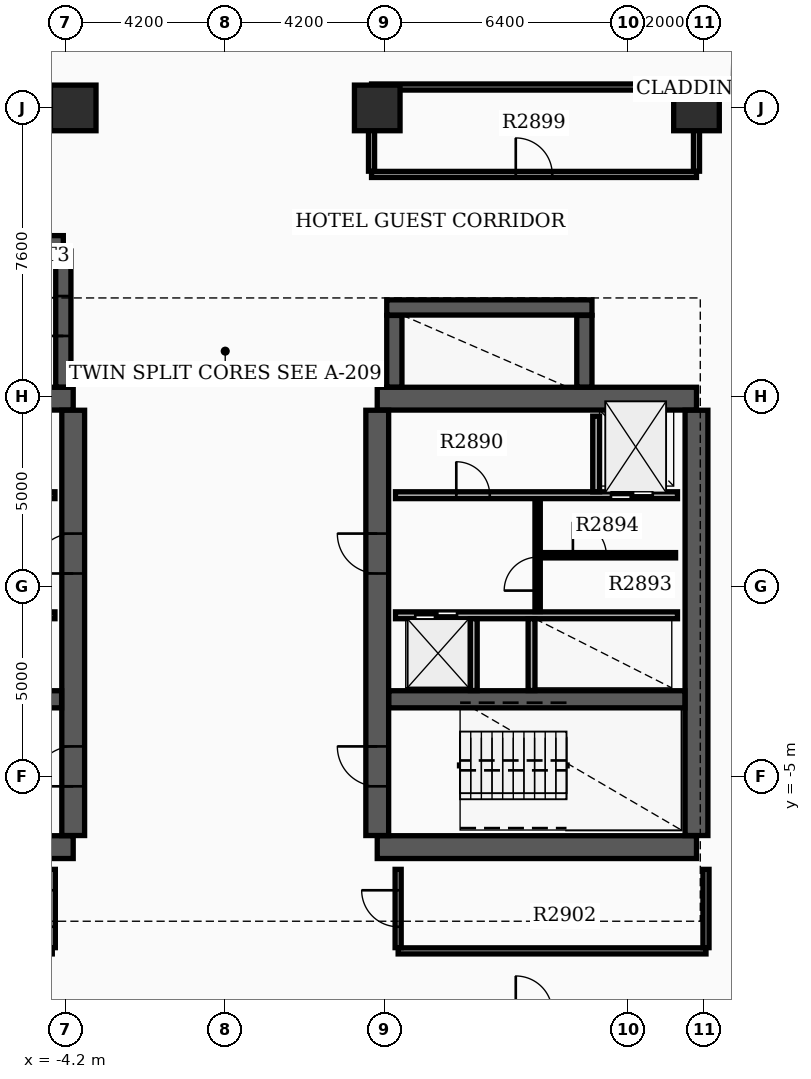
"""IFC4 building model, lengths in metres.
Left out: names, types, materials, properties, quantities, classifications, styles, units other than length and angle.
Written with IfcOpenShell. Run it as: python <this file> out.ifc"""

import sys

from ifc_helpers import new_model, si_unit, direction, frame, frame_2d, origin, origin_2d, place, context, subcontext, project, spatial, rectangle, extrude, element, fill, save


model = new_model("IFC4")
c1 = context("Model", 3, precision=1e-05, world=origin(), true_north=direction((0.0, 1.0)))
c2 = subcontext(c1, "Body", "Model", "MODEL_VIEW")
j1 = project(units=[si_unit("LENGTHUNIT", "METRE"), si_unit("PLANEANGLEUNIT", "RADIAN")], contexts=[c1])
p1 = place(None, origin())
s1 = spatial("IfcSite", under=j1, at=p1, CompositionType="ELEMENT")
p2 = place(p1, origin())
s2 = spatial("IfcBuilding", under=s1, at=p2, CompositionType="ELEMENT")
p3 = place(p2, frame((0.0, 0.0, 180.0)))
s3 = spatial("IfcBuildingStorey", under=s2, at=p3, CompositionType="ELEMENT", Elevation=180.0)
for number, where, z_axis, x_axis in (
    (1, (-12.4, -6.85, 0.0), (0.0, 0.0, 1.0), (1.0, 0.0, 0.0)),
    (2, (-12.4, 4.95, 0.0), (0.0, 0.0, 1.0), (1.0, 0.0, 0.0)),
):
    element("IfcWall", number, at=place(p3, frame(where, z_axis=z_axis, x_axis=x_axis)), inside=s3, PredefinedType="SHEAR", context=c2, shape_type="SweptSolid", body=[
        extrude(rectangle(XDim=8.4, YDim=0.6, at=frame_2d((4.2, 0.0))), origin(), (0.0, 0.0, 1.0), 3.7),
    ])
p4 = place(p3, frame((-4.0, -6.545, 0.0), z_axis=(0.0, 0.0, 1.0), x_axis=(0.0, 1.0, 0.0)))
e3 = element("IfcWall", 3, at=p4, inside=s3, PredefinedType="SHEAR", context=c2, shape_type="SweptSolid", body=[
    extrude(rectangle(XDim=11.19, YDim=0.6, at=frame_2d((5.595, 0.0))), origin(), (0.0, 0.0, 1.0), 3.7),
])
p5 = place(p4, frame((1.295, 0.0, 0.0)))
e4 = element("IfcOpeningElement", 4, at=p5, cuts=e3, PredefinedType="OPENING", context=c2, shape_type="SweptSolid", body=[
    extrude(rectangle(XDim=1.05, YDim=2.15, at=frame_2d((0.525, 1.075))), frame((0.0, 0.31, 0.0), z_axis=(0.0, -1.0, 0.0), x_axis=(1.0, 0.0, 0.0)), (0.0, 0.0, 1.0), 0.62),
])
p6 = place(p4, frame((6.895, 0.0, 0.0)))
e5 = element("IfcOpeningElement", 5, at=p6, cuts=e3, PredefinedType="OPENING", context=c2, shape_type="SweptSolid", body=[
    extrude(rectangle(XDim=1.05, YDim=2.15, at=frame_2d((0.525, 1.075))), frame((0.0, 0.31, 0.0), z_axis=(0.0, -1.0, 0.0), x_axis=(1.0, 0.0, 0.0)), (0.0, 0.0, 1.0), 0.62),
])
p7 = place(p3, frame((-12.095, -2.96, 0.0), z_axis=(0.0, 0.0, 1.0), x_axis=(1.0, 0.0, 0.0)))
e6 = element("IfcWall", 6, at=p7, inside=s3, PredefinedType="SHEAR", context=c2, shape_type="SweptSolid", body=[
    extrude(rectangle(XDim=7.79, YDim=0.45, at=frame_2d((3.895, 0.0))), origin(), (0.0, 0.0, 1.0), 3.7),
])
for number, where, z_axis, x_axis in (
    (7, (4.0, -6.85, 0.0), (0.0, 0.0, 1.0), (1.0, 0.0, 0.0)),
    (8, (4.0, 4.95, 0.0), (0.0, 0.0, 1.0), (1.0, 0.0, 0.0)),
):
    element("IfcWall", number, at=place(p3, frame(where, z_axis=z_axis, x_axis=x_axis)), inside=s3, PredefinedType="SHEAR", context=c2, shape_type="SweptSolid", body=[
        extrude(rectangle(XDim=8.4, YDim=0.6, at=frame_2d((4.2, 0.0))), origin(), (0.0, 0.0, 1.0), 3.7),
    ])
p8 = place(p3, frame((4.0, -6.545, 0.0), z_axis=(0.0, 0.0, 1.0), x_axis=(0.0, 1.0, 0.0)))
e9 = element("IfcWall", 9, at=p8, inside=s3, PredefinedType="SHEAR", context=c2, shape_type="SweptSolid", body=[
    extrude(rectangle(XDim=11.19, YDim=0.6, at=frame_2d((5.595, 0.0))), origin(), (0.0, 0.0, 1.0), 3.7),
])
p9 = place(p8, frame((1.295, 0.0, 0.0)))
e10 = element("IfcOpeningElement", 10, at=p9, cuts=e9, PredefinedType="OPENING", context=c2, shape_type="SweptSolid", body=[
    extrude(rectangle(XDim=1.05, YDim=2.15, at=frame_2d((0.525, 1.075))), frame((0.0, 0.31, 0.0), z_axis=(0.0, -1.0, 0.0), x_axis=(1.0, 0.0, 0.0)), (0.0, 0.0, 1.0), 0.62),
])
p10 = place(p8, frame((6.895, 0.0, 0.0)))
e11 = element("IfcOpeningElement", 11, at=p10, cuts=e9, PredefinedType="OPENING", context=c2, shape_type="SweptSolid", body=[
    extrude(rectangle(XDim=1.05, YDim=2.15, at=frame_2d((0.525, 1.075))), frame((0.0, 0.31, 0.0), z_axis=(0.0, -1.0, 0.0), x_axis=(1.0, 0.0, 0.0)), (0.0, 0.0, 1.0), 0.62),
])
p11 = place(p3, frame((12.4, -6.545, 0.0), z_axis=(0.0, 0.0, 1.0), x_axis=(0.0, 1.0, 0.0)))
e12 = element("IfcWall", 12, at=p11, inside=s3, PredefinedType="SHEAR", context=c2, shape_type="SweptSolid", body=[
    extrude(rectangle(XDim=11.19, YDim=0.6, at=frame_2d((5.595, 0.0))), origin(), (0.0, 0.0, 1.0), 3.7),
])
p12 = place(p3, frame((4.305, -2.96, 0.0), z_axis=(0.0, 0.0, 1.0), x_axis=(1.0, 0.0, 0.0)))
e13 = element("IfcWall", 13, at=p12, inside=s3, PredefinedType="SHEAR", context=c2, shape_type="SweptSolid", body=[
    extrude(rectangle(XDim=7.79, YDim=0.45, at=frame_2d((3.895, 0.0))), origin(), (0.0, 0.0, 1.0), 3.7),
])
p13 = place(p3, frame((-12.22, 9.04, 0.0), z_axis=(0.0, 0.0, 1.0), x_axis=(1.0, 0.0, 0.0)))
e14 = element("IfcWall", 14, at=p13, inside=s3, PredefinedType="SHEAR", context=c2, shape_type="SweptSolid", body=[
    extrude(rectangle(XDim=7.96, YDim=0.4, at=frame_2d((3.98, 0.0))), origin(), (0.0, 0.0, 1.0), 3.7),
])
p14 = place(p3, frame((-4.26, 5.255, 0.0), z_axis=(0.0, 0.0, 1.0), x_axis=(0.0, 1.0, 0.0)))
e15 = element("IfcWall", 15, at=p14, inside=s3, PredefinedType="SHEAR", context=c2, shape_type="SweptSolid", body=[
    extrude(rectangle(XDim=3.58, YDim=0.4, at=frame_2d((1.79, 0.0))), origin(), (0.0, 0.0, 1.0), 3.7),
])
p15 = place(p14, frame((1.345, 0.0, 0.0)))
e16 = element("IfcOpeningElement", 16, at=p15, cuts=e15, PredefinedType="OPENING", context=c2, shape_type="SweptSolid", body=[
    extrude(rectangle(XDim=1.05, YDim=2.15, at=frame_2d((0.525, 1.075))), frame((0.0, 0.21, 0.0), z_axis=(0.0, -1.0, 0.0), x_axis=(1.0, 0.0, 0.0)), (0.0, 0.0, 1.0), 0.42),
])
p16 = place(p3, frame((4.45, 5.255, 0.0), z_axis=(0.0, 0.0, 1.0), x_axis=(0.0, 1.0, 0.0)))
e17 = element("IfcWall", 17, at=p16, inside=s3, PredefinedType="SHEAR", context=c2, shape_type="SweptSolid", body=[
    extrude(rectangle(XDim=1.885, YDim=0.4, at=frame_2d((0.942, 0.0))), origin(), (0.0, 0.0, 1.0), 3.7),
])
p17 = place(p3, frame((4.25, 7.35, 0.0), z_axis=(0.0, 0.0, 1.0), x_axis=(1.0, 0.0, 0.0)))
e18 = element("IfcWall", 18, at=p17, inside=s3, PredefinedType="SHEAR", context=c2, shape_type="SweptSolid", body=[
    extrude(rectangle(XDim=5.4, YDim=0.4, at=frame_2d((2.7, 0.0))), origin(), (0.0, 0.0, 1.0), 3.7),
])
p18 = place(p3, frame((9.45, 5.255, 0.0), z_axis=(0.0, 0.0, 1.0), x_axis=(0.0, 1.0, 0.0)))
e19 = element("IfcWall", 19, at=p18, inside=s3, PredefinedType="SHEAR", context=c2, shape_type="SweptSolid", body=[
    extrude(rectangle(XDim=1.885, YDim=0.4, at=frame_2d((0.942, 0.0))), origin(), (0.0, 0.0, 1.0), 3.7),
])
for number, where, z_axis, x_axis in (
    (20, (12.4, 12.6, 0.0), (0.0, 0.0, 1.0), (1.0, 0.0, 0.0)),
    (21, (4.0, 12.6, 0.0), (0.0, 0.0, 1.0), (1.0, 0.0, 0.0)),
    (22, (-4.0, 12.6, 0.0), (0.0, 0.0, 1.0), (1.0, 0.0, 0.0)),
):
    element("IfcColumn", number, at=place(p3, frame(where, z_axis=z_axis, x_axis=x_axis)), inside=s3, PredefinedType="COLUMN", context=c2, shape_type="SweptSolid", body=[
        extrude(rectangle(XDim=1.2, YDim=1.2, at=origin_2d()), origin(), (0.0, 0.0, 1.0), 3.9),
    ])
p19 = place(p3, frame((-11.9, 2.41, 0.0), z_axis=(0.0, 0.0, 1.0), x_axis=(1.0, 0.0, 0.0)))
e23 = element("IfcWall", 23, at=p19, inside=s3, PredefinedType="SOLIDWALL", context=c2, shape_type="SweptSolid", body=[
    extrude(rectangle(XDim=7.42, YDim=0.18, at=frame_2d((3.71, 0.0))), origin(), (0.0, 0.0, 1.0), 2.96),
])
p20 = place(p19, frame((0.55, 0.0, 0.0)))
e24 = element("IfcOpeningElement", 24, at=p20, cuts=e23, PredefinedType="OPENING", context=c2, shape_type="SweptSolid", body=[
    extrude(rectangle(XDim=1.1, YDim=2.15, at=frame_2d((0.55, 1.075))), frame((0.0, 0.1, 0.0), z_axis=(0.0, -1.0, 0.0), x_axis=(1.0, 0.0, 0.0)), (0.0, 0.0, 1.0), 0.2),
])
p21 = place(p19, frame((4.9, 0.0, 0.0)))
e25 = element("IfcOpeningElement", 25, at=p21, cuts=e23, PredefinedType="OPENING", context=c2, shape_type="SweptSolid", body=[
    extrude(rectangle(XDim=0.88, YDim=2.1, at=frame_2d((0.44, 1.05))), frame((0.0, 0.1, 0.0), z_axis=(0.0, -1.0, 0.0), x_axis=(1.0, 0.0, 0.0)), (0.0, 0.0, 1.0), 0.2),
])
p22 = place(p3, frame((4.48, 2.41, 0.0), z_axis=(0.0, 0.0, 1.0), x_axis=(1.0, 0.0, 0.0)))
e26 = element("IfcWall", 26, at=p22, inside=s3, PredefinedType="SOLIDWALL", context=c2, shape_type="SweptSolid", body=[
    extrude(rectangle(XDim=7.42, YDim=0.18, at=frame_2d((3.71, 0.0))), origin(), (0.0, 0.0, 1.0), 2.96),
])
p23 = place(p22, frame((5.67, 0.0, 0.0)))
e27 = element("IfcOpeningElement", 27, at=p23, cuts=e26, PredefinedType="OPENING", context=c2, shape_type="SweptSolid", body=[
    extrude(rectangle(XDim=1.1, YDim=2.15, at=frame_2d((0.55, 1.075))), frame((0.0, 0.1, 0.0), z_axis=(0.0, -1.0, 0.0), x_axis=(1.0, 0.0, 0.0)), (0.0, 0.0, 1.0), 0.2),
])
p24 = place(p22, frame((1.6, 0.0, 0.0)))
e28 = element("IfcOpeningElement", 28, at=p24, cuts=e26, PredefinedType="OPENING", context=c2, shape_type="SweptSolid", body=[
    extrude(rectangle(XDim=0.88, YDim=2.1, at=frame_2d((0.44, 1.05))), frame((0.0, 0.1, 0.0), z_axis=(0.0, -1.0, 0.0), x_axis=(1.0, 0.0, 0.0)), (0.0, 0.0, 1.0), 0.2),
])
p25 = place(p3, frame((-11.9, -0.75, 0.0), z_axis=(0.0, 0.0, 1.0), x_axis=(1.0, 0.0, 0.0)))
e29 = element("IfcWall", 29, at=p25, inside=s3, PredefinedType="SOLIDWALL", context=c2, shape_type="SweptSolid", body=[
    extrude(rectangle(XDim=7.42, YDim=0.18, at=frame_2d((3.71, 0.0))), origin(), (0.0, 0.0, 1.0), 2.96),
])
p26 = place(p25, frame((0.45, 0.0, 0.0)))
e30 = element("IfcOpeningElement", 30, at=p26, cuts=e29, PredefinedType="OPENING", context=c2, shape_type="SweptSolid", body=[
    extrude(rectangle(XDim=1.1, YDim=2.15, at=frame_2d((0.55, 1.075))), frame((0.0, 0.1, 0.0), z_axis=(0.0, -1.0, 0.0), x_axis=(1.0, 0.0, 0.0)), (0.0, 0.0, 1.0), 0.2),
])
p27 = place(p25, frame((2.35, 0.0, 0.0)))
e31 = element("IfcOpeningElement", 31, at=p27, cuts=e29, PredefinedType="OPENING", context=c2, shape_type="SweptSolid", body=[
    extrude(rectangle(XDim=1.1, YDim=2.15, at=frame_2d((0.55, 1.075))), frame((0.0, 0.1, 0.0), z_axis=(0.0, -1.0, 0.0), x_axis=(1.0, 0.0, 0.0)), (0.0, 0.0, 1.0), 0.2),
])
p28 = place(p3, frame((4.48, -0.75, 0.0), z_axis=(0.0, 0.0, 1.0), x_axis=(1.0, 0.0, 0.0)))
e32 = element("IfcWall", 32, at=p28, inside=s3, PredefinedType="SOLIDWALL", context=c2, shape_type="SweptSolid", body=[
    extrude(rectangle(XDim=7.42, YDim=0.18, at=frame_2d((3.71, 0.0))), origin(), (0.0, 0.0, 1.0), 2.96),
])
p29 = place(p28, frame((0.52, 0.0, 0.0)))
e33 = element("IfcOpeningElement", 33, at=p29, cuts=e32, PredefinedType="OPENING", context=c2, shape_type="SweptSolid", body=[
    extrude(rectangle(XDim=1.1, YDim=2.15, at=frame_2d((0.55, 1.075))), frame((0.0, 0.1, 0.0), z_axis=(0.0, -1.0, 0.0), x_axis=(1.0, 0.0, 0.0)), (0.0, 0.0, 1.0), 0.2),
])
p30 = place(p3, frame((9.76, 2.5, 0.0), z_axis=(0.0, 0.0, 1.0), x_axis=(0.0, 1.0, 0.0)))
e34 = element("IfcWall", 34, at=p30, inside=s3, PredefinedType="SOLIDWALL", context=c2, shape_type="SweptSolid", body=[
    extrude(rectangle(XDim=1.99, YDim=0.18, at=frame_2d((0.995, 0.0))), origin(), (0.0, 0.0, 1.0), 2.96),
])
for number, where, z_axis, x_axis in (
    (35, (6.54, -2.73, 0.0), (0.0, 0.0, 1.0), (0.0, 1.0, 0.0)),
    (36, (8.06, -2.73, 0.0), (0.0, 0.0, 1.0), (0.0, 1.0, 0.0)),
):
    element("IfcWall", number, at=place(p3, frame(where, z_axis=z_axis, x_axis=x_axis)), inside=s3, PredefinedType="SOLIDWALL", context=c2, shape_type="SweptSolid", body=[
        extrude(rectangle(XDim=1.89, YDim=0.18, at=frame_2d((0.945, 0.0))), origin(), (0.0, 0.0, 1.0), 2.96),
    ])
p31 = place(p3, frame((8.22, -0.65, 0.0), z_axis=(0.0, 0.0, 1.0), x_axis=(0.0, 1.0, 0.0)))
e37 = element("IfcWall", 37, at=p31, inside=s3, PredefinedType="SOLIDWALL", context=c2, shape_type="SweptSolid", body=[
    extrude(rectangle(XDim=2.96, YDim=0.14, at=frame_2d((1.48, 0.0))), origin(), (0.0, 0.0, 1.0), 2.96),
])
p32 = place(p31, frame((0.55, 0.0, 0.0)))
e38 = element("IfcOpeningElement", 38, at=p32, cuts=e37, PredefinedType="OPENING", context=c2, shape_type="SweptSolid", body=[
    extrude(rectangle(XDim=0.88, YDim=2.1, at=frame_2d((0.44, 1.05))), frame((0.0, 0.08, 0.0), z_axis=(0.0, -1.0, 0.0), x_axis=(1.0, 0.0, 0.0)), (0.0, 0.0, 1.0), 0.16),
])
p33 = place(p3, frame((8.298, 0.83, 0.0), z_axis=(0.0, 0.0, 1.0), x_axis=(1.0, 0.0, 0.0)))
e39 = element("IfcWall", 39, at=p33, inside=s3, PredefinedType="PARTITIONING", context=c2, shape_type="SweptSolid", body=[
    extrude(rectangle(XDim=3.552, YDim=0.14, at=frame_2d((1.776, 0.0))), origin(), (0.0, 0.0, 1.0), 2.96),
])
p34 = place(p33, frame((0.85, 0.0, 0.0)))
e40 = element("IfcOpeningElement", 40, at=p34, cuts=e39, PredefinedType="OPENING", context=c2, shape_type="SweptSolid", body=[
    extrude(rectangle(XDim=0.88, YDim=2.1, at=frame_2d((0.44, 1.05))), frame((0.0, 0.08, 0.0), z_axis=(0.0, -1.0, 0.0), x_axis=(1.0, 0.0, 0.0)), (0.0, 0.0, 1.0), 0.16),
])
p35 = place(p3, frame((3.85, 10.85, 0.0), z_axis=(0.0, 0.0, 1.0), x_axis=(1.0, 0.0, 0.0)))
e41 = element("IfcWall", 41, at=p35, inside=s3, PredefinedType="PARTITIONING", context=c2, shape_type="SweptSolid", body=[
    extrude(rectangle(XDim=8.55, YDim=0.16, at=frame_2d((4.275, 0.0))), origin(), (0.0, 0.0, 1.0), 2.96),
])
p36 = place(p35, frame((3.795, 0.0, 0.0)))
e42 = element("IfcOpeningElement", 42, at=p36, cuts=e41, PredefinedType="OPENING", context=c2, shape_type="SweptSolid", body=[
    extrude(rectangle(XDim=0.96, YDim=2.15, at=frame_2d((0.48, 1.075))), frame((0.0, 0.09, 0.0), z_axis=(0.0, -1.0, 0.0), x_axis=(1.0, 0.0, 0.0)), (0.0, 0.0, 1.0), 0.18),
])
p37 = place(p3, frame((3.85, 13.15, 0.0), z_axis=(0.0, 0.0, 1.0), x_axis=(1.0, 0.0, 0.0)))
e43 = element("IfcWall", 43, at=p37, inside=s3, PredefinedType="PARTITIONING", context=c2, shape_type="SweptSolid", body=[
    extrude(rectangle(XDim=8.55, YDim=0.16, at=frame_2d((4.275, 0.0))), origin(), (0.0, 0.0, 1.0), 2.96),
])
for number, where, z_axis, x_axis in (
    (44, (3.85, 10.935, 0.0), (0.0, 0.0, 1.0), (0.0, 1.0, 0.0)),
    (45, (12.4, 10.935, 0.0), (0.0, 0.0, 1.0), (0.0, 1.0, 0.0)),
):
    element("IfcWall", number, at=place(p3, frame(where, z_axis=z_axis, x_axis=x_axis)), inside=s3, PredefinedType="PARTITIONING", context=c2, shape_type="SweptSolid", body=[
        extrude(rectangle(XDim=2.13, YDim=0.16, at=frame_2d((1.065, 0.0))), origin(), (0.0, 0.0, 1.0), 2.96),
    ])
p38 = place(p3, frame((4.55, -9.58, 0.0), z_axis=(0.0, 0.0, 1.0), x_axis=(1.0, 0.0, 0.0)))
e46 = element("IfcWall", 46, at=p38, inside=s3, PredefinedType="PARTITIONING", context=c2, shape_type="SweptSolid", body=[
    extrude(rectangle(XDim=8.1, YDim=0.16, at=frame_2d((4.05, 0.0))), origin(), (0.0, 0.0, 1.0), 2.96),
])
p39 = place(p3, frame((4.55, -9.495, 0.0), z_axis=(0.0, 0.0, 1.0), x_axis=(0.0, 1.0, 0.0)))
e47 = element("IfcWall", 47, at=p39, inside=s3, PredefinedType="PARTITIONING", context=c2, shape_type="SweptSolid", body=[
    extrude(rectangle(XDim=2.06, YDim=0.16, at=frame_2d((1.03, 0.0))), origin(), (0.0, 0.0, 1.0), 2.96),
])
p40 = place(p39, frame((0.55, 0.0, 0.0)))
e48 = element("IfcOpeningElement", 48, at=p40, cuts=e47, PredefinedType="OPENING", context=c2, shape_type="SweptSolid", body=[
    extrude(rectangle(XDim=0.96, YDim=2.15, at=frame_2d((0.48, 1.075))), frame((0.0, 0.09, 0.0), z_axis=(0.0, -1.0, 0.0), x_axis=(1.0, 0.0, 0.0)), (0.0, 0.0, 1.0), 0.18),
])
p41 = place(p3, frame((12.65, -9.495, 0.0), z_axis=(0.0, 0.0, 1.0), x_axis=(0.0, 1.0, 0.0)))
e49 = element("IfcWall", 49, at=p41, inside=s3, PredefinedType="PARTITIONING", context=c2, shape_type="SweptSolid", body=[
    extrude(rectangle(XDim=2.06, YDim=0.16, at=frame_2d((1.03, 0.0))), origin(), (0.0, 0.0, 1.0), 2.96),
])
p42 = place(p3, frame((-4.55, -9.495, 0.0), z_axis=(0.0, 0.0, 1.0), x_axis=(0.0, 1.0, 0.0)))
e50 = element("IfcWall", 50, at=p42, inside=s3, PredefinedType="PARTITIONING", context=c2, shape_type="SweptSolid", body=[
    extrude(rectangle(XDim=2.06, YDim=0.16, at=frame_2d((1.03, 0.0))), origin(), (0.0, 0.0, 1.0), 2.96),
])
p43 = place(p42, frame((0.55, 0.0, 0.0)))
e51 = element("IfcOpeningElement", 51, at=p43, cuts=e50, PredefinedType="OPENING", context=c2, shape_type="SweptSolid", body=[
    extrude(rectangle(XDim=0.96, YDim=2.15, at=frame_2d((0.48, 1.075))), frame((0.0, 0.09, 0.0), z_axis=(0.0, -1.0, 0.0), x_axis=(1.0, 0.0, 0.0)), (0.0, 0.0, 1.0), 0.18),
])
p44 = place(p5, origin())
e52 = element("IfcDoor", 52, at=p44, inside=s3, OperationType="SINGLE_SWING_LEFT", PredefinedType="DOOR", context=c2, shape_type="SweptSolid", body=[
    extrude(rectangle(XDim=1.05, YDim=2.15, at=frame_2d((0.525, 1.075))), frame((0.0, 0.025, 0.0), z_axis=(0.0, -1.0, 0.0), x_axis=(1.0, 0.0, 0.0)), (0.0, 0.0, 1.0), 0.05),
])
fill(e4, e52)
p45 = place(p9, origin())
e53 = element("IfcDoor", 53, at=p45, inside=s3, OperationType="SINGLE_SWING_RIGHT", PredefinedType="DOOR", context=c2, shape_type="SweptSolid", body=[
    extrude(rectangle(XDim=1.05, YDim=2.15, at=frame_2d((0.525, 1.075))), frame((0.0, 0.025, 0.0), z_axis=(0.0, -1.0, 0.0), x_axis=(1.0, 0.0, 0.0)), (0.0, 0.0, 1.0), 0.05),
])
fill(e10, e53)
p46 = place(p6, origin())
e54 = element("IfcDoor", 54, at=p46, inside=s3, OperationType="SINGLE_SWING_LEFT", PredefinedType="DOOR", context=c2, shape_type="SweptSolid", body=[
    extrude(rectangle(XDim=1.05, YDim=2.15, at=frame_2d((0.525, 1.075))), frame((0.0, 0.025, 0.0), z_axis=(0.0, -1.0, 0.0), x_axis=(1.0, 0.0, 0.0)), (0.0, 0.0, 1.0), 0.05),
])
fill(e5, e54)
p47 = place(p10, origin())
e55 = element("IfcDoor", 55, at=p47, inside=s3, OperationType="SINGLE_SWING_RIGHT", PredefinedType="DOOR", context=c2, shape_type="SweptSolid", body=[
    extrude(rectangle(XDim=1.05, YDim=2.15, at=frame_2d((0.525, 1.075))), frame((0.0, 0.025, 0.0), z_axis=(0.0, -1.0, 0.0), x_axis=(1.0, 0.0, 0.0)), (0.0, 0.0, 1.0), 0.05),
])
fill(e11, e55)
p48 = place(p15, origin())
e56 = element("IfcDoor", 56, at=p48, inside=s3, OperationType="SINGLE_SWING_LEFT", PredefinedType="DOOR", context=c2, shape_type="SweptSolid", body=[
    extrude(rectangle(XDim=1.05, YDim=2.15, at=frame_2d((0.525, 1.075))), frame((0.0, 0.025, 0.0), z_axis=(0.0, -1.0, 0.0), x_axis=(1.0, 0.0, 0.0)), (0.0, 0.0, 1.0), 0.05),
])
fill(e16, e56)
p49 = place(p23, origin())
e57 = element("IfcDoor", 57, at=p49, inside=s3, OperationType="DOUBLE_DOOR_SLIDING", PredefinedType="DOOR", context=c2, shape_type="SweptSolid", body=[
    extrude(rectangle(XDim=1.1, YDim=2.15, at=frame_2d((0.55, 1.075))), frame((0.0, 0.025, 0.0), z_axis=(0.0, -1.0, 0.0), x_axis=(1.0, 0.0, 0.0)), (0.0, 0.0, 1.0), 0.05),
])
fill(e27, e57)
p50 = place(p29, origin())
e58 = element("IfcDoor", 58, at=p50, inside=s3, OperationType="DOUBLE_DOOR_SLIDING", PredefinedType="DOOR", context=c2, shape_type="SweptSolid", body=[
    extrude(rectangle(XDim=1.1, YDim=2.15, at=frame_2d((0.55, 1.075))), frame((0.0, 0.025, 0.0), z_axis=(0.0, -1.0, 0.0), x_axis=(1.0, 0.0, 0.0)), (0.0, 0.0, 1.0), 0.05),
])
fill(e33, e58)
p51 = place(p24, origin())
e59 = element("IfcDoor", 59, at=p51, inside=s3, OperationType="SINGLE_SWING_LEFT", PredefinedType="DOOR", context=c2, shape_type="SweptSolid", body=[
    extrude(rectangle(XDim=0.88, YDim=2.1, at=frame_2d((0.44, 1.05))), frame((0.0, 0.025, 0.0), z_axis=(0.0, -1.0, 0.0), x_axis=(1.0, 0.0, 0.0)), (0.0, 0.0, 1.0), 0.05),
])
fill(e28, e59)
p52 = place(p32, origin())
e60 = element("IfcDoor", 60, at=p52, inside=s3, OperationType="SINGLE_SWING_LEFT", PredefinedType="DOOR", context=c2, shape_type="SweptSolid", body=[
    extrude(rectangle(XDim=0.88, YDim=2.1, at=frame_2d((0.44, 1.05))), frame((0.0, 0.025, 0.0), z_axis=(0.0, -1.0, 0.0), x_axis=(1.0, 0.0, 0.0)), (0.0, 0.0, 1.0), 0.05),
])
fill(e38, e60)
p53 = place(p34, origin())
e61 = element("IfcDoor", 61, at=p53, inside=s3, OperationType="SINGLE_SWING_LEFT", PredefinedType="DOOR", context=c2, shape_type="SweptSolid", body=[
    extrude(rectangle(XDim=0.88, YDim=2.1, at=frame_2d((0.44, 1.05))), frame((0.0, 0.025, 0.0), z_axis=(0.0, -1.0, 0.0), x_axis=(1.0, 0.0, 0.0)), (0.0, 0.0, 1.0), 0.05),
])
fill(e40, e61)
p54 = place(p36, origin())
e62 = element("IfcDoor", 62, at=p54, inside=s3, OperationType="SINGLE_SWING_LEFT", PredefinedType="DOOR", context=c2, shape_type="SweptSolid", body=[
    extrude(rectangle(XDim=0.96, YDim=2.15, at=frame_2d((0.48, 1.075))), frame((0.0, 0.025, 0.0), z_axis=(0.0, -1.0, 0.0), x_axis=(1.0, 0.0, 0.0)), (0.0, 0.0, 1.0), 0.05),
])
fill(e42, e62)
p55 = place(p40, origin())
e63 = element("IfcDoor", 63, at=p55, inside=s3, OperationType="SINGLE_SWING_RIGHT", PredefinedType="DOOR", context=c2, shape_type="SweptSolid", body=[
    extrude(rectangle(XDim=0.96, YDim=2.15, at=frame_2d((0.48, 1.075))), frame((0.0, 0.025, 0.0), z_axis=(0.0, -1.0, 0.0), x_axis=(1.0, 0.0, 0.0)), (0.0, 0.0, 1.0), 0.05),
])
fill(e48, e63)
p56 = place(p43, origin())
e64 = element("IfcDoor", 64, at=p56, inside=s3, OperationType="SINGLE_SWING_LEFT", PredefinedType="DOOR", context=c2, shape_type="SweptSolid", body=[
    extrude(rectangle(XDim=0.96, YDim=2.15, at=frame_2d((0.48, 1.075))), frame((0.0, 0.025, 0.0), z_axis=(0.0, -1.0, 0.0), x_axis=(1.0, 0.0, 0.0)), (0.0, 0.0, 1.0), 0.05),
])
fill(e51, e64)
save(model, sys.argv[1])
